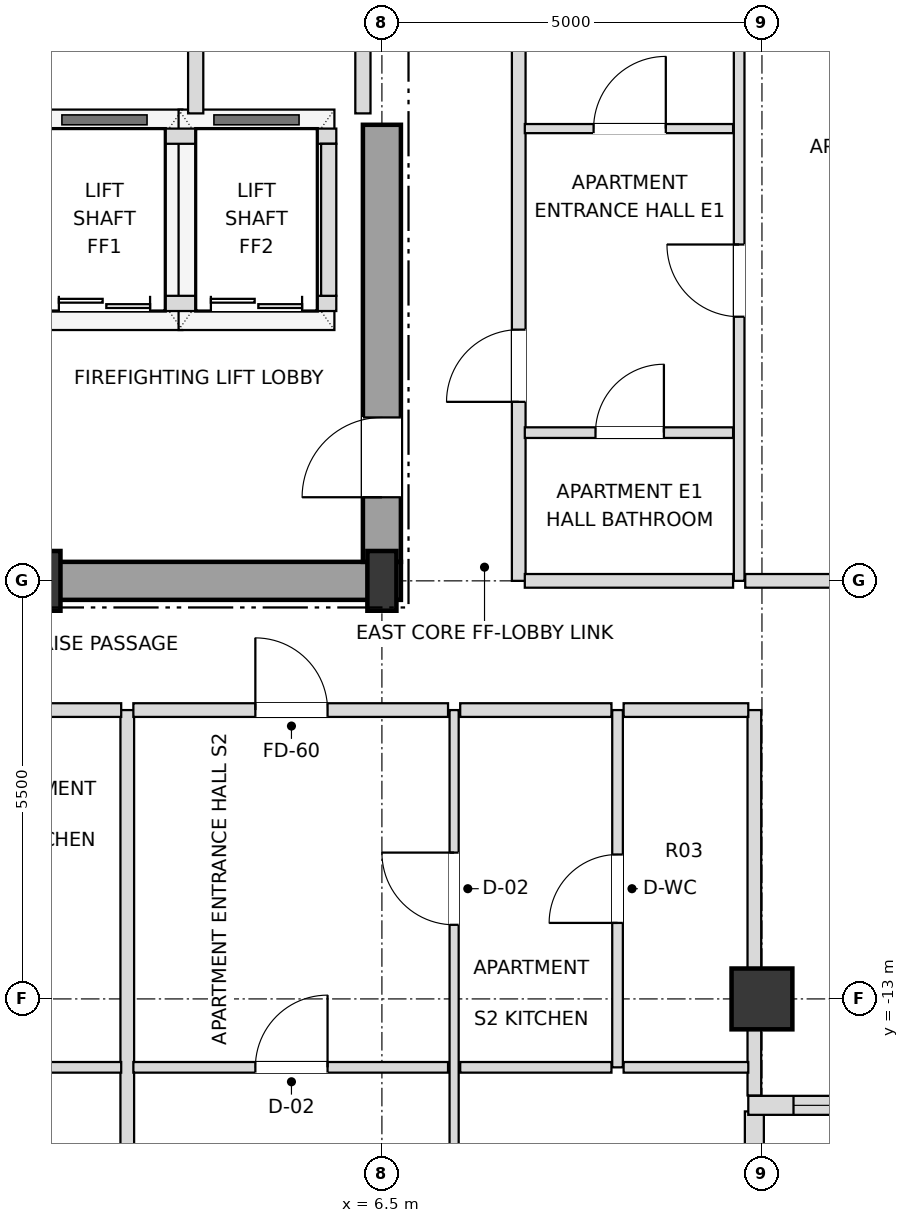
"""IFC4 building model, lengths in metres.
Left out: names, types, materials, properties, quantities, classifications, styles, units other than length and angle.
Written with IfcOpenShell. Run it as: python <this file> out.ifc"""

import sys

from ifc_helpers import new_model, si_unit, direction, frame, frame_2d, origin, origin_2d, place, context, subcontext, project, spatial, rectangle, i_section, extrude, element, fill, save


model = new_model("IFC4")
c1 = context("Model", 3, precision=1e-05, world=origin(), true_north=direction((0.0, 1.0)))
c2 = subcontext(c1, "Body", "Model", "MODEL_VIEW")
j1 = project(units=[si_unit("LENGTHUNIT", "METRE"), si_unit("PLANEANGLEUNIT", "RADIAN")], contexts=[c1])
p1 = place(None, origin())
s1 = spatial("IfcSite", under=j1, at=p1, CompositionType="ELEMENT")
p2 = place(p1, origin())
s2 = spatial("IfcBuilding", under=s1, at=p2, CompositionType="ELEMENT")
p3 = place(p2, frame((0.0, 0.0, 240.3)))
s3 = spatial("IfcBuildingStorey", under=s2, at=p3, CompositionType="ELEMENT", Elevation=240.3)
for number, where, z_axis, x_axis in (
    (1, (2.08, -7.5, 0.0), (0.0, 0.0, 1.0), (1.0, 0.0, 0.0)),
    (2, (6.5, -7.5, 0.0), (0.0, 0.0, 1.0), (1.0, 0.0, 0.0)),
):
    element("IfcColumn", number, at=place(p3, frame(where, z_axis=z_axis, x_axis=x_axis)), inside=s3, PredefinedType="COLUMN", context=c2, shape_type="SweptSolid", body=[
        extrude(i_section(OverallWidth=0.382, OverallDepth=0.786, WebThickness=0.02, FlangeThickness=0.033, at=origin_2d()), origin(), (0.0, 0.0, 1.0), 3.6),
    ])
p4 = place(p3, frame((11.5, -13.0, 0.0), z_axis=(0.0, 0.0, 1.0), x_axis=(1.0, 0.0, 0.0)))
e3 = element("IfcColumn", 3, at=p4, inside=s3, PredefinedType="COLUMN", context=c2, shape_type="SweptSolid", body=[
    extrude(rectangle(XDim=0.8, YDim=0.8, at=origin_2d()), origin(), (0.0, 0.0, 1.0), 3.6),
])
p5 = place(p3, frame((11.4, -19.82, 0.0), z_axis=(0.0, 0.0, 1.0), x_axis=(0.0, 1.0, 0.0)))
e4 = element("IfcWall", 4, at=p5, inside=s3, PredefinedType="SOLIDWALL", context=c2, shape_type="SweptSolid", body=[
    extrude(rectangle(XDim=5.34, YDim=0.25, at=frame_2d((2.67, 0.0))), origin(), (0.0, 0.0, 1.0), 2.748),
])
p6 = place(p5, frame((1.925, 0.0, 0.72)))
e5 = element("IfcOpeningElement", 5, at=p6, cuts=e4, PredefinedType="OPENING", context=c2, shape_type="SweptSolid", body=[
    extrude(rectangle(XDim=1.8, YDim=1.68, at=frame_2d((0.9, 0.84))), frame((0.0, 0.135, 0.0), z_axis=(0.0, -1.0, 0.0), x_axis=(1.0, 0.0, 0.0)), (0.0, 0.0, 1.0), 0.27),
])
p7 = place(p3, frame((11.32, -14.4, 0.0), z_axis=(0.0, 0.0, 1.0), x_axis=(1.0, 0.0, 0.0)))
e6 = element("IfcWall", 6, at=p7, inside=s3, PredefinedType="SOLIDWALL", context=c2, shape_type="SweptSolid", body=[
    extrude(rectangle(XDim=5.66, YDim=0.25, at=frame_2d((2.83, 0.0))), origin(), (0.0, 0.0, 1.0), 2.748),
])
p8 = place(p7, frame((0.595, 0.0, 0.72)))
e7 = element("IfcOpeningElement", 7, at=p8, cuts=e6, PredefinedType="OPENING", context=c2, shape_type="SweptSolid", body=[
    extrude(rectangle(XDim=1.8, YDim=1.68, at=frame_2d((0.9, 0.84))), frame((0.0, 0.135, 0.0), z_axis=(0.0, -1.0, 0.0), x_axis=(1.0, 0.0, 0.0)), (0.0, 0.0, 1.0), 0.27),
])
p9 = place(p7, frame((3.265, 0.0, 0.72)))
e8 = element("IfcOpeningElement", 8, at=p9, cuts=e6, PredefinedType="OPENING", context=c2, shape_type="SweptSolid", body=[
    extrude(rectangle(XDim=1.8, YDim=1.68, at=frame_2d((0.9, 0.84))), frame((0.0, 0.135, 0.0), z_axis=(0.0, -1.0, 0.0), x_axis=(1.0, 0.0, 0.0)), (0.0, 0.0, 1.0), 0.27),
])
p10 = place(p3, frame((0.0, -7.5, 0.0), z_axis=(0.0, 0.0, 1.0), x_axis=(1.0, 0.0, 0.0)))
e9 = element("IfcWall", 9, at=p10, inside=s3, PredefinedType="SHEAR", context=c2, shape_type="SweptSolid", body=[
    extrude(rectangle(XDim=6.75, YDim=0.5, at=frame_2d((3.375, 0.0))), origin(), (0.0, 0.0, 1.0), 3.38),
])
p11 = place(p3, frame((6.5, -7.25, 0.0), z_axis=(0.0, 0.0, 1.0), x_axis=(0.0, 1.0, 0.0)))
e10 = element("IfcWall", 10, at=p11, inside=s3, PredefinedType="SHEAR", context=c2, shape_type="SweptSolid", body=[
    extrude(rectangle(XDim=5.75, YDim=0.5, at=frame_2d((2.875, 0.0))), origin(), (0.0, 0.0, 1.0), 3.38),
])
p12 = place(p11, frame((0.85, 0.0, 0.0)))
e11 = element("IfcOpeningElement", 11, at=p12, cuts=e10, PredefinedType="OPENING", context=c2, shape_type="SweptSolid", body=[
    extrude(rectangle(XDim=1.05, YDim=2.15, at=frame_2d((0.525, 1.075))), frame((0.0, 0.26, 0.0), z_axis=(0.0, -1.0, 0.0), x_axis=(1.0, 0.0, 0.0)), (0.0, 0.0, 1.0), 0.52),
])
p13 = place(p3, frame((1.8, -3.85, 0.0), z_axis=(0.0, 0.0, 1.0), x_axis=(1.0, 0.0, 0.0)))
e12 = element("IfcWall", 12, at=p13, inside=s3, PredefinedType="SOLIDWALL", context=c2, shape_type="SweptSolid", body=[
    extrude(rectangle(XDim=4.1, YDim=0.2, at=frame_2d((2.05, 0.0))), origin(), (0.0, 0.0, 1.0), 3.38),
])
p14 = place(p13, frame((0.45, 0.0, 0.0)))
e13 = element("IfcOpeningElement", 13, at=p14, cuts=e12, PredefinedType="OPENING", context=c2, shape_type="SweptSolid", body=[
    extrude(rectangle(XDim=1.2, YDim=2.2, at=frame_2d((0.6, 1.1))), frame((0.0, 0.11, 0.0), z_axis=(0.0, -1.0, 0.0), x_axis=(1.0, 0.0, 0.0)), (0.0, 0.0, 1.0), 0.22),
])
p15 = place(p13, frame((2.45, 0.0, 0.0)))
e14 = element("IfcOpeningElement", 14, at=p15, cuts=e12, PredefinedType="OPENING", context=c2, shape_type="SweptSolid", body=[
    extrude(rectangle(XDim=1.2, YDim=2.2, at=frame_2d((0.6, 1.1))), frame((0.0, 0.11, 0.0), z_axis=(0.0, -1.0, 0.0), x_axis=(1.0, 0.0, 0.0)), (0.0, 0.0, 1.0), 0.22),
])
p16 = place(p3, frame((1.8, -1.65, 0.0), z_axis=(0.0, 0.0, 1.0), x_axis=(1.0, 0.0, 0.0)))
e15 = element("IfcWall", 15, at=p16, inside=s3, PredefinedType="SOLIDWALL", context=c2, shape_type="SweptSolid", body=[
    extrude(rectangle(XDim=4.1, YDim=0.2, at=frame_2d((2.05, 0.0))), origin(), (0.0, 0.0, 1.0), 3.38),
])
p17 = place(p3, frame((5.8, -3.75, 0.0), z_axis=(0.0, 0.0, 1.0), x_axis=(0.0, 1.0, 0.0)))
e16 = element("IfcWall", 16, at=p17, inside=s3, PredefinedType="SOLIDWALL", context=c2, shape_type="SweptSolid", body=[
    extrude(rectangle(XDim=2.0, YDim=0.2, at=frame_2d((1.0, 0.0))), origin(), (0.0, 0.0, 1.0), 3.38),
])
p18 = place(p3, frame((3.15, -19.9, 0.0), z_axis=(0.0, 0.0, 1.0), x_axis=(0.0, 1.0, 0.0)))
e17 = element("IfcWall", 17, at=p18, inside=s3, PredefinedType="PARTITIONING", context=c2, shape_type="SweptSolid", body=[
    extrude(rectangle(XDim=10.7, YDim=0.18, at=frame_2d((5.35, 0.0))), origin(), (0.0, 0.0, 1.0), 3.018),
])
p19 = place(p3, frame((4.05, -1.35, 0.0), z_axis=(0.0, 0.0, 1.0), x_axis=(0.0, 1.0, 0.0)))
e18 = element("IfcWall", 18, at=p19, inside=s3, PredefinedType="SOLIDWALL", context=c2, shape_type="SweptSolid", body=[
    extrude(rectangle(XDim=3.2, YDim=0.2, at=frame_2d((1.6, 0.0))), origin(), (0.0, 0.0, 1.0), 3.38),
])
p20 = place(p19, frame((1.125, 0.0, 0.0)))
e19 = element("IfcOpeningElement", 19, at=p20, cuts=e18, PredefinedType="OPENING", context=c2, shape_type="SweptSolid", body=[
    extrude(rectangle(XDim=0.95, YDim=2.15, at=frame_2d((0.475, 1.075))), frame((0.0, 0.11, 0.0), z_axis=(0.0, -1.0, 0.0), x_axis=(1.0, 0.0, 0.0)), (0.0, 0.0, 1.0), 0.22),
])
p21 = place(p3, frame((6.25, -1.35, 0.0), z_axis=(0.0, 0.0, 1.0), x_axis=(0.0, 1.0, 0.0)))
e20 = element("IfcWall", 20, at=p21, inside=s3, PredefinedType="SOLIDWALL", context=c2, shape_type="SweptSolid", body=[
    extrude(rectangle(XDim=3.2, YDim=0.2, at=frame_2d((1.6, 0.0))), origin(), (0.0, 0.0, 1.0), 3.38),
])
p22 = place(p3, frame((7.45, -19.9, 0.0), z_axis=(0.0, 0.0, 1.0), x_axis=(0.0, 1.0, 0.0)))
e21 = element("IfcWall", 21, at=p22, inside=s3, PredefinedType="PARTITIONING", context=c2, shape_type="SweptSolid", body=[
    extrude(rectangle(XDim=10.7, YDim=0.12, at=frame_2d((5.35, 0.0))), origin(), (0.0, 0.0, 1.0), 2.826),
])
p23 = place(p22, frame((7.875, 0.0, 0.0)))
e22 = element("IfcOpeningElement", 22, at=p23, cuts=e21, PredefinedType="OPENING", context=c2, shape_type="SweptSolid", body=[
    extrude(rectangle(XDim=0.95, YDim=2.1, at=frame_2d((0.475, 1.05))), frame((0.0, 0.07, 0.0), z_axis=(0.0, -1.0, 0.0), x_axis=(1.0, 0.0, 0.0)), (0.0, 0.0, 1.0), 0.14),
])
p24 = place(p22, frame((2.55, 0.0, 0.0)))
e23 = element("IfcOpeningElement", 23, at=p24, cuts=e21, PredefinedType="OPENING", context=c2, shape_type="SweptSolid", body=[
    extrude(rectangle(XDim=0.9, YDim=2.1, at=frame_2d((0.45, 1.05))), frame((0.0, 0.07, 0.0), z_axis=(0.0, -1.0, 0.0), x_axis=(1.0, 0.0, 0.0)), (0.0, 0.0, 1.0), 0.14),
])
p25 = place(p3, frame((8.3, -7.5, 0.0), z_axis=(0.0, 0.0, 1.0), x_axis=(0.0, 1.0, 0.0)))
e24 = element("IfcWall", 24, at=p25, inside=s3, PredefinedType="PARTITIONING", context=c2, shape_type="SweptSolid", body=[
    extrude(rectangle(XDim=15.0, YDim=0.18, at=frame_2d((7.5, 0.0))), origin(), (0.0, 0.0, 1.0), 3.38),
])
p26 = place(p25, frame((2.355, 0.0, 0.0)))
e25 = element("IfcOpeningElement", 25, at=p26, cuts=e24, PredefinedType="OPENING", context=c2, shape_type="SweptSolid", body=[
    extrude(rectangle(XDim=0.95, YDim=2.15, at=frame_2d((0.475, 1.075))), frame((0.0, 0.1, 0.0), z_axis=(0.0, -1.0, 0.0), x_axis=(1.0, 0.0, 0.0)), (0.0, 0.0, 1.0), 0.2),
])
p27 = place(p3, frame((9.6, -13.9, 0.0), z_axis=(0.0, 0.0, 1.0), x_axis=(0.0, 1.0, 0.0)))
e26 = element("IfcWall", 26, at=p27, inside=s3, PredefinedType="PARTITIONING", context=c2, shape_type="SweptSolid", body=[
    extrude(rectangle(XDim=4.7, YDim=0.14, at=frame_2d((2.35, 0.0))), origin(), (0.0, 0.0, 1.0), 2.826),
])
p28 = place(p27, frame((1.9, 0.0, 0.0)))
e27 = element("IfcOpeningElement", 27, at=p28, cuts=e26, PredefinedType="OPENING", context=c2, shape_type="SweptSolid", body=[
    extrude(rectangle(XDim=0.9, YDim=2.1, at=frame_2d((0.45, 1.05))), frame((0.0, 0.08, 0.0), z_axis=(0.0, -1.0, 0.0), x_axis=(1.0, 0.0, 0.0)), (0.0, 0.0, 1.0), 0.16),
])
p29 = place(p3, frame((11.2, -7.5, 0.0), z_axis=(0.0, 0.0, 1.0), x_axis=(0.0, 1.0, 0.0)))
e28 = element("IfcWall", 28, at=p29, inside=s3, PredefinedType="PARTITIONING", context=c2, shape_type="SweptSolid", body=[
    extrude(rectangle(XDim=15.0, YDim=0.14, at=frame_2d((7.5, 0.0))), origin(), (0.0, 0.0, 1.0), 3.38),
])
p30 = place(p29, frame((3.475, 0.0, 0.0)))
e29 = element("IfcOpeningElement", 29, at=p30, cuts=e28, PredefinedType="OPENING", context=c2, shape_type="SweptSolid", body=[
    extrude(rectangle(XDim=0.95, YDim=2.1, at=frame_2d((0.475, 1.05))), frame((0.0, 0.08, 0.0), z_axis=(0.0, -1.0, 0.0), x_axis=(1.0, 0.0, 0.0)), (0.0, 0.0, 1.0), 0.16),
])
p31 = place(p3, frame((11.4, -14.27, 0.0), z_axis=(0.0, 0.0, 1.0), x_axis=(0.0, 1.0, 0.0)))
e30 = element("IfcWall", 30, at=p31, inside=s3, PredefinedType="PARTITIONING", context=c2, shape_type="SweptSolid", body=[
    extrude(rectangle(XDim=5.07, YDim=0.18, at=frame_2d((2.535, 0.0))), origin(), (0.0, 0.0, 1.0), 2.748),
])
p32 = place(p3, frame((0.73, -13.9, 0.0), z_axis=(0.0, 0.0, 1.0), x_axis=(1.0, 0.0, 0.0)))
e31 = element("IfcWall", 31, at=p32, inside=s3, PredefinedType="PARTITIONING", context=c2, shape_type="SweptSolid", body=[
    extrude(rectangle(XDim=2.34, YDim=0.14, at=frame_2d((1.17, 0.0))), origin(), (0.0, 0.0, 1.0), 3.38),
])
p33 = place(p3, frame((3.23, -13.9, 0.0), z_axis=(0.0, 0.0, 1.0), x_axis=(1.0, 0.0, 0.0)))
e32 = element("IfcWall", 32, at=p33, inside=s3, PredefinedType="PARTITIONING", context=c2, shape_type="SweptSolid", body=[
    extrude(rectangle(XDim=4.14, YDim=0.14, at=frame_2d((2.07, 0.0))), origin(), (0.0, 0.0, 1.0), 2.826),
])
p34 = place(p33, frame((1.605, 0.0, 0.0)))
e33 = element("IfcOpeningElement", 33, at=p34, cuts=e32, PredefinedType="OPENING", context=c2, shape_type="SweptSolid", body=[
    extrude(rectangle(XDim=0.95, YDim=2.1, at=frame_2d((0.475, 1.05))), frame((0.0, 0.08, 0.0), z_axis=(0.0, -1.0, 0.0), x_axis=(1.0, 0.0, 0.0)), (0.0, 0.0, 1.0), 0.16),
])
p35 = place(p3, frame((7.53, -13.9, 0.0), z_axis=(0.0, 0.0, 1.0), x_axis=(1.0, 0.0, 0.0)))
e34 = element("IfcWall", 34, at=p35, inside=s3, PredefinedType="PARTITIONING", context=c2, shape_type="SweptSolid", body=[
    extrude(rectangle(XDim=1.99, YDim=0.14, at=frame_2d((0.995, 0.0))), origin(), (0.0, 0.0, 1.0), 3.38),
])
p36 = place(p3, frame((9.68, -13.9, 0.0), z_axis=(0.0, 0.0, 1.0), x_axis=(1.0, 0.0, 0.0)))
e35 = element("IfcWall", 35, at=p36, inside=s3, PredefinedType="PARTITIONING", context=c2, shape_type="SweptSolid", body=[
    extrude(rectangle(XDim=1.64, YDim=0.14, at=frame_2d((0.82, 0.0))), origin(), (0.0, 0.0, 1.0), 3.38),
])
p37 = place(p3, frame((0.73, -9.2, 0.0), z_axis=(0.0, 0.0, 1.0), x_axis=(1.0, 0.0, 0.0)))
e36 = element("IfcWall", 36, at=p37, inside=s3, PredefinedType="PARTITIONING", context=c2, shape_type="SweptSolid", body=[
    extrude(rectangle(XDim=2.34, YDim=0.18, at=frame_2d((1.17, 0.0))), origin(), (0.0, 0.0, 1.0), 3.38),
])
p38 = place(p3, frame((3.23, -9.2, 0.0), z_axis=(0.0, 0.0, 1.0), x_axis=(1.0, 0.0, 0.0)))
e37 = element("IfcWall", 37, at=p38, inside=s3, PredefinedType="PARTITIONING", context=c2, shape_type="SweptSolid", body=[
    extrude(rectangle(XDim=4.14, YDim=0.18, at=frame_2d((2.07, 0.0))), origin(), (0.0, 0.0, 1.0), 2.826),
])
p39 = place(p38, frame((1.605, 0.0, 0.0)))
e38 = element("IfcOpeningElement", 38, at=p39, cuts=e37, PredefinedType="OPENING", context=c2, shape_type="SweptSolid", body=[
    extrude(rectangle(XDim=0.95, YDim=2.15, at=frame_2d((0.475, 1.075))), frame((0.0, 0.1, 0.0), z_axis=(0.0, -1.0, 0.0), x_axis=(1.0, 0.0, 0.0)), (0.0, 0.0, 1.0), 0.2),
])
p40 = place(p3, frame((7.53, -9.2, 0.0), z_axis=(0.0, 0.0, 1.0), x_axis=(1.0, 0.0, 0.0)))
e39 = element("IfcWall", 39, at=p40, inside=s3, PredefinedType="PARTITIONING", context=c2, shape_type="SweptSolid", body=[
    extrude(rectangle(XDim=1.99, YDim=0.18, at=frame_2d((0.995, 0.0))), origin(), (0.0, 0.0, 1.0), 3.38),
])
p41 = place(p3, frame((9.68, -9.2, 0.0), z_axis=(0.0, 0.0, 1.0), x_axis=(1.0, 0.0, 0.0)))
e40 = element("IfcWall", 40, at=p41, inside=s3, PredefinedType="PARTITIONING", context=c2, shape_type="SweptSolid", body=[
    extrude(rectangle(XDim=1.64, YDim=0.18, at=frame_2d((0.82, 0.0))), origin(), (0.0, 0.0, 1.0), 3.38),
])
p42 = place(p3, frame((8.38, -7.5, 0.0), z_axis=(0.0, 0.0, 1.0), x_axis=(1.0, 0.0, 0.0)))
e41 = element("IfcWall", 41, at=p42, inside=s3, PredefinedType="PARTITIONING", context=c2, shape_type="SweptSolid", body=[
    extrude(rectangle(XDim=2.74, YDim=0.18, at=frame_2d((1.37, 0.0))), origin(), (0.0, 0.0, 1.0), 2.826),
])
p43 = place(p3, frame((11.28, -7.5, 0.0), z_axis=(0.0, 0.0, 1.0), x_axis=(1.0, 0.0, 0.0)))
e42 = element("IfcWall", 42, at=p43, inside=s3, PredefinedType="PARTITIONING", context=c2, shape_type="SweptSolid", body=[
    extrude(rectangle(XDim=5.62, YDim=0.18, at=frame_2d((2.81, 0.0))), origin(), (0.0, 0.0, 1.0), 2.826),
])
p44 = place(p3, frame((8.38, -5.55, 0.0), z_axis=(0.0, 0.0, 1.0), x_axis=(1.0, 0.0, 0.0)))
e43 = element("IfcWall", 43, at=p44, inside=s3, PredefinedType="PARTITIONING", context=c2, shape_type="SweptSolid", body=[
    extrude(rectangle(XDim=2.74, YDim=0.14, at=frame_2d((1.37, 0.0))), origin(), (0.0, 0.0, 1.0), 3.38),
])
p45 = place(p44, frame((0.93, 0.0, 0.0)))
e44 = element("IfcOpeningElement", 44, at=p45, cuts=e43, PredefinedType="OPENING", context=c2, shape_type="SweptSolid", body=[
    extrude(rectangle(XDim=0.9, YDim=2.1, at=frame_2d((0.45, 1.05))), frame((0.0, 0.08, 0.0), z_axis=(0.0, -1.0, 0.0), x_axis=(1.0, 0.0, 0.0)), (0.0, 0.0, 1.0), 0.16),
])
p46 = place(p3, frame((8.38, -1.55, 0.0), z_axis=(0.0, 0.0, 1.0), x_axis=(1.0, 0.0, 0.0)))
e45 = element("IfcWall", 45, at=p46, inside=s3, PredefinedType="PARTITIONING", context=c2, shape_type="SweptSolid", body=[
    extrude(rectangle(XDim=2.74, YDim=0.12, at=frame_2d((1.37, 0.0))), origin(), (0.0, 0.0, 1.0), 3.38),
])
p47 = place(p46, frame((0.905, 0.0, 0.0)))
e46 = element("IfcOpeningElement", 46, at=p47, cuts=e45, PredefinedType="OPENING", context=c2, shape_type="SweptSolid", body=[
    extrude(rectangle(XDim=0.95, YDim=2.1, at=frame_2d((0.475, 1.05))), frame((0.0, 0.07, 0.0), z_axis=(0.0, -1.0, 0.0), x_axis=(1.0, 0.0, 0.0)), (0.0, 0.0, 1.0), 0.14),
])
p48 = place(p8, origin())
e47 = element("IfcWindow", 47, at=p48, inside=s3, PartitioningType="SINGLE_PANEL", PredefinedType="WINDOW", context=c2, shape_type="SweptSolid", body=[
    extrude(rectangle(XDim=1.8, YDim=1.68, at=frame_2d((0.9, 0.84))), frame((0.0, 0.03, 0.0), z_axis=(0.0, -1.0, 0.0), x_axis=(1.0, 0.0, 0.0)), (0.0, 0.0, 1.0), 0.06),
])
fill(e7, e47)
p49 = place(p12, origin())
e48 = element("IfcDoor", 48, at=p49, inside=s3, OperationType="SINGLE_SWING_LEFT", PredefinedType="DOOR", context=c2, shape_type="SweptSolid", body=[
    extrude(rectangle(XDim=1.05, YDim=2.15, at=frame_2d((0.525, 1.075))), frame((0.0, 0.025, 0.0), z_axis=(0.0, -1.0, 0.0), x_axis=(1.0, 0.0, 0.0)), (0.0, 0.0, 1.0), 0.05),
])
fill(e11, e48)
p50 = place(p14, origin())
e49 = element("IfcDoor", 49, at=p50, inside=s3, OperationType="DOUBLE_DOOR_SLIDING", PredefinedType="DOOR", context=c2, shape_type="SweptSolid", body=[
    extrude(rectangle(XDim=1.2, YDim=2.2, at=frame_2d((0.6, 1.1))), frame((0.0, 0.025, 0.0), z_axis=(0.0, -1.0, 0.0), x_axis=(1.0, 0.0, 0.0)), (0.0, 0.0, 1.0), 0.05),
])
fill(e13, e49)
p51 = place(p15, origin())
e50 = element("IfcDoor", 50, at=p51, inside=s3, OperationType="DOUBLE_DOOR_SLIDING", PredefinedType="DOOR", context=c2, shape_type="SweptSolid", body=[
    extrude(rectangle(XDim=1.2, YDim=2.2, at=frame_2d((0.6, 1.1))), frame((0.0, 0.025, 0.0), z_axis=(0.0, -1.0, 0.0), x_axis=(1.0, 0.0, 0.0)), (0.0, 0.0, 1.0), 0.05),
])
fill(e14, e50)
p52 = place(p39, origin())
e51 = element("IfcDoor", 51, at=p52, inside=s3, OperationType="SINGLE_SWING_LEFT", PredefinedType="DOOR", context=c2, shape_type="SweptSolid", body=[
    extrude(rectangle(XDim=0.95, YDim=2.15, at=frame_2d((0.475, 1.075))), frame((0.0, 0.025, 0.0), z_axis=(0.0, -1.0, 0.0), x_axis=(1.0, 0.0, 0.0)), (0.0, 0.0, 1.0), 0.05),
])
fill(e38, e51)
p53 = place(p23, origin())
e52 = element("IfcDoor", 52, at=p53, inside=s3, OperationType="SINGLE_SWING_RIGHT", PredefinedType="DOOR", context=c2, shape_type="SweptSolid", body=[
    extrude(rectangle(XDim=0.95, YDim=2.1, at=frame_2d((0.475, 1.05))), frame((0.0, 0.025, 0.0), z_axis=(0.0, -1.0, 0.0), x_axis=(1.0, 0.0, 0.0)), (0.0, 0.0, 1.0), 0.05),
])
fill(e22, e52)
p54 = place(p28, origin())
e53 = element("IfcDoor", 53, at=p54, inside=s3, OperationType="SINGLE_SWING_LEFT", PredefinedType="DOOR", context=c2, shape_type="SweptSolid", body=[
    extrude(rectangle(XDim=0.9, YDim=2.1, at=frame_2d((0.45, 1.05))), frame((0.0, 0.025, 0.0), z_axis=(0.0, -1.0, 0.0), x_axis=(1.0, 0.0, 0.0)), (0.0, 0.0, 1.0), 0.05),
])
fill(e27, e53)
p55 = place(p34, origin())
e54 = element("IfcDoor", 54, at=p55, inside=s3, OperationType="SINGLE_SWING_RIGHT", PredefinedType="DOOR", context=c2, shape_type="SweptSolid", body=[
    extrude(rectangle(XDim=0.95, YDim=2.1, at=frame_2d((0.475, 1.05))), frame((0.0, 0.025, 0.0), z_axis=(0.0, -1.0, 0.0), x_axis=(1.0, 0.0, 0.0)), (0.0, 0.0, 1.0), 0.05),
])
fill(e33, e54)
p56 = place(p45, origin())
e55 = element("IfcDoor", 55, at=p56, inside=s3, OperationType="SINGLE_SWING_RIGHT", PredefinedType="DOOR", context=c2, shape_type="SweptSolid", body=[
    extrude(rectangle(XDim=0.9, YDim=2.1, at=frame_2d((0.45, 1.05))), frame((0.0, 0.025, 0.0), z_axis=(0.0, -1.0, 0.0), x_axis=(1.0, 0.0, 0.0)), (0.0, 0.0, 1.0), 0.05),
])
fill(e44, e55)
p57 = place(p26, origin())
e56 = element("IfcDoor", 56, at=p57, inside=s3, OperationType="SINGLE_SWING_LEFT", PredefinedType="DOOR", context=c2, shape_type="SweptSolid", body=[
    extrude(rectangle(XDim=0.95, YDim=2.15, at=frame_2d((0.475, 1.075))), frame((0.0, 0.025, 0.0), z_axis=(0.0, -1.0, 0.0), x_axis=(1.0, 0.0, 0.0)), (0.0, 0.0, 1.0), 0.05),
])
fill(e25, e56)
p58 = place(p47, origin())
e57 = element("IfcDoor", 57, at=p58, inside=s3, OperationType="SINGLE_SWING_RIGHT", PredefinedType="DOOR", context=c2, shape_type="SweptSolid", body=[
    extrude(rectangle(XDim=0.95, YDim=2.1, at=frame_2d((0.475, 1.05))), frame((0.0, 0.025, 0.0), z_axis=(0.0, -1.0, 0.0), x_axis=(1.0, 0.0, 0.0)), (0.0, 0.0, 1.0), 0.05),
])
fill(e46, e57)
p59 = place(p30, origin())
e58 = element("IfcDoor", 58, at=p59, inside=s3, OperationType="SINGLE_SWING_RIGHT", PredefinedType="DOOR", context=c2, shape_type="SweptSolid", body=[
    extrude(rectangle(XDim=0.95, YDim=2.1, at=frame_2d((0.475, 1.05))), frame((0.0, 0.025, 0.0), z_axis=(0.0, -1.0, 0.0), x_axis=(1.0, 0.0, 0.0)), (0.0, 0.0, 1.0), 0.05),
])
fill(e29, e58)
save(model, sys.argv[1])
